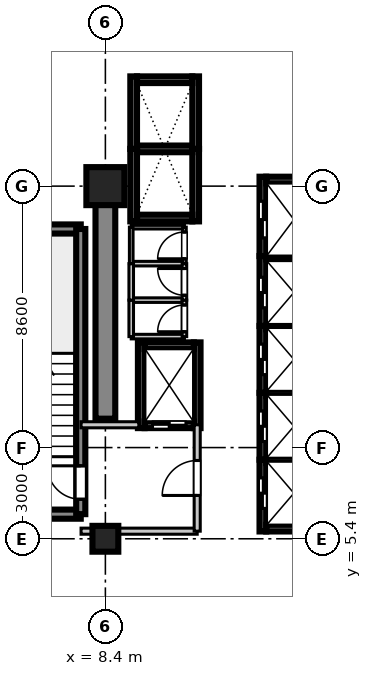
"""IFC4 building model, lengths in metres.
Left out: names, types, materials, properties, quantities, classifications, styles, units other than length and angle.
Written with IfcOpenShell. Run it as: python <this file> out.ifc"""

import sys

from ifc_helpers import new_model, si_unit, direction, frame, frame_2d, origin, origin_2d, place, context, subcontext, project, spatial, rectangle, extrude, source, transform, mapped, element, fill, save


model = new_model("IFC4")
c1 = context("Model", 3, precision=1e-05, world=origin(), true_north=direction((0.0, 1.0)))
c2 = subcontext(c1, "Body", "Model", "MODEL_VIEW")
j1 = project(units=[si_unit("LENGTHUNIT", "METRE"), si_unit("PLANEANGLEUNIT", "RADIAN")], contexts=[c1])
p1 = place(None, origin())
s1 = spatial("IfcSite", under=j1, at=p1, CompositionType="ELEMENT")
p2 = place(p1, origin())
s2 = spatial("IfcBuilding", under=s1, at=p2, CompositionType="ELEMENT")
p3 = place(p2, frame((0.0, 0.0, 110.2)))
s3 = spatial("IfcBuildingStorey", under=s2, at=p3, CompositionType="ELEMENT", Elevation=110.2)
m1 = source(origin(), c2, "Body", "SweptSolid", [
    extrude(rectangle(XDim=0.85, YDim=0.85, at=origin_2d()), origin(), (0.0, 0.0, 1.0), 3.605),
])
p4 = place(p3, frame((8.4, 5.4, 0.0), z_axis=(0.0, 0.0, 1.0), x_axis=(1.0, 0.0, 0.0)))
e1 = element("IfcColumn", 1, at=p4, inside=s3, PredefinedType="PILASTER", context=c2, shape_type="MappedRepresentation", body=[
    mapped(m1, transform((0.0, 0.0, 0.0), scale=1.0)),
])
m2 = source(origin(), c2, "Body", "SweptSolid", [
    extrude(rectangle(XDim=1.25, YDim=1.25, at=origin_2d()), origin(), (0.0, 0.0, 1.0), 3.605),
])
p5 = place(p3, frame((8.4, 17.0, 0.0), z_axis=(0.0, 0.0, 1.0), x_axis=(1.0, 0.0, 0.0)))
e2 = element("IfcColumn", 2, at=p5, inside=s3, PredefinedType="COLUMN", context=c2, shape_type="MappedRepresentation", body=[
    mapped(m2, transform((0.0, 0.0, 0.0), scale=1.0)),
])
m3 = source(origin(), c2, "Body", "SweptSolid", [
    extrude(rectangle(XDim=7.65, YDim=0.65, at=frame_2d((3.825, 0.0))), origin(), (0.0, 0.0, 1.0), 3.38),
])
p6 = place(p3, frame((8.4, 9.35, 0.0), z_axis=(0.0, 0.0, 1.0), x_axis=(0.0, 1.0, 0.0)))
e3 = element("IfcWall", 3, at=p6, inside=s3, PredefinedType="SHEAR", context=c2, shape_type="MappedRepresentation", body=[
    mapped(m3, transform((0.0, 0.0, 0.0), scale=1.0)),
])
m4 = source(origin(), c2, "Body", "SweptSolid", [
    extrude(rectangle(XDim=3.98, YDim=0.3, at=frame_2d((1.99, 0.0))), origin(), (0.0, 0.0, 1.0), 3.38),
])
for number, where, z_axis, x_axis in (
    (4, (3.61, 6.21, 0.0), (0.0, 0.0, 1.0), (1.0, 0.0, 0.0)),
    (5, (3.61, 15.59, 0.0), (0.0, 0.0, 1.0), (1.0, 0.0, 0.0)),
):
    element("IfcWall", number, at=place(p3, frame(where, z_axis=z_axis, x_axis=x_axis)), inside=s3, PredefinedType="SHEAR", context=c2, shape_type="MappedRepresentation", body=[
        mapped(m4, transform((0.0, 0.0, 0.0), scale=1.0)),
    ])
m5 = source(origin(), c2, "Body", "SweptSolid", [
    extrude(rectangle(XDim=9.38, YDim=0.3, at=frame_2d((4.69, 0.0))), origin(), (0.0, 0.0, 1.0), 3.38),
])
p7 = place(p3, frame((7.59, 6.21, 0.0), z_axis=(0.0, 0.0, 1.0), x_axis=(0.0, 1.0, 0.0)))
e6 = element("IfcWall", 6, at=p7, inside=s3, PredefinedType="SHEAR", context=c2, shape_type="MappedRepresentation", body=[
    mapped(m5, transform((0.0, 0.0, 0.0), scale=1.0)),
])
p8 = place(p7, frame((0.49, 0.0, 0.0)))
e7 = element("IfcOpeningElement", 7, at=p8, cuts=e6, PredefinedType="OPENING", context=c2, shape_type="SweptSolid", body=[
    extrude(rectangle(XDim=1.1, YDim=2.15, at=frame_2d((0.55, 1.075))), frame((0.0, 0.16, 0.0), z_axis=(0.0, -1.0, 0.0), x_axis=(1.0, 0.0, 0.0)), (0.0, 0.0, 1.0), 0.32),
])
m6 = source(origin(), c2, "Body", "SweptSolid", [
    extrude(rectangle(XDim=2.36, YDim=0.22, at=frame_2d((1.18, 0.0))), origin(), (0.0, 0.0, 1.0), 3.38),
])
p9 = place(p3, frame((13.58, 5.64, 0.0), z_axis=(0.0, 0.0, 1.0), x_axis=(0.0, 1.0, 0.0)))
e8 = element("IfcWall", 8, at=p9, inside=s3, PredefinedType="SHEAR", context=c2, shape_type="MappedRepresentation", body=[
    mapped(m6, transform((0.0, 0.0, 0.0), scale=1.0)),
])
p10 = place(p9, frame((0.76, 0.0, 0.0)))
e9 = element("IfcOpeningElement", 9, at=p10, cuts=e8, PredefinedType="OPENING", context=c2, shape_type="SweptSolid", body=[
    extrude(rectangle(XDim=1.0, YDim=2.2, at=frame_2d((0.5, 1.1))), frame((0.0, 0.12, 0.0), z_axis=(0.0, -1.0, 0.0), x_axis=(1.0, 0.0, 0.0)), (0.0, 0.0, 1.0), 0.24),
])
m7 = source(origin(), c2, "Body", "SweptSolid", [
    extrude(rectangle(XDim=1.82, YDim=0.22, at=frame_2d((0.91, 0.0))), origin(), (0.0, 0.0, 1.0), 3.38),
])
p11 = place(p3, frame((13.69, 5.75, 0.0), z_axis=(0.0, 0.0, 1.0), x_axis=(1.0, 0.0, 0.0)))
e10 = element("IfcWall", 10, at=p11, inside=s3, PredefinedType="SHEAR", context=c2, shape_type="MappedRepresentation", body=[
    mapped(m7, transform((0.0, 0.0, 0.0), scale=1.0)),
])
m8 = source(origin(), c2, "Body", "SweptSolid", [
    extrude(rectangle(XDim=1.82, YDim=0.22, at=frame_2d((0.91, 0.0))), origin(), (0.0, 0.0, 1.0), 3.65),
])
p12 = place(p3, frame((13.69, 8.0, 0.0), z_axis=(0.0, 0.0, 1.0), x_axis=(1.0, 0.0, 0.0)))
e11 = element("IfcWall", 11, at=p12, inside=s3, PredefinedType="SHEAR", context=c2, shape_type="MappedRepresentation", body=[
    mapped(m8, transform((0.0, 0.0, 0.0), scale=1.0)),
])
m9 = source(origin(), c2, "Body", "SweptSolid", [
    extrude(rectangle(XDim=2.2, YDim=0.22, at=frame_2d((1.1, 0.0))), origin(), (0.0, 0.0, 1.0), 3.38),
])
p13 = place(p3, frame((13.58, 8.0, 0.0), z_axis=(0.0, 0.0, 1.0), x_axis=(0.0, 1.0, 0.0)))
e12 = element("IfcWall", 12, at=p13, inside=s3, PredefinedType="SHEAR", context=c2, shape_type="MappedRepresentation", body=[
    mapped(m9, transform((0.0, 0.0, 0.0), scale=1.0)),
])
p14 = place(p13, frame((0.6, 0.0, 0.0)))
e13 = element("IfcOpeningElement", 13, at=p14, cuts=e12, PredefinedType="OPENING", context=c2, shape_type="SweptSolid", body=[
    extrude(rectangle(XDim=1.0, YDim=2.2, at=frame_2d((0.5, 1.1))), frame((0.0, 0.12, 0.0), z_axis=(0.0, -1.0, 0.0), x_axis=(1.0, 0.0, 0.0)), (0.0, 0.0, 1.0), 0.24),
])
p15 = place(p3, frame((13.69, 10.2, 0.0), z_axis=(0.0, 0.0, 1.0), x_axis=(1.0, 0.0, 0.0)))
e14 = element("IfcWall", 14, at=p15, inside=s3, PredefinedType="SHEAR", context=c2, shape_type="MappedRepresentation", body=[
    mapped(m8, transform((0.0, 0.0, 0.0), scale=1.0)),
])
p16 = place(p3, frame((13.58, 10.2, 0.0), z_axis=(0.0, 0.0, 1.0), x_axis=(0.0, 1.0, 0.0)))
e15 = element("IfcWall", 15, at=p16, inside=s3, PredefinedType="SHEAR", context=c2, shape_type="MappedRepresentation", body=[
    mapped(m9, transform((0.0, 0.0, 0.0), scale=1.0)),
])
p17 = place(p16, frame((0.6, 0.0, 0.0)))
e16 = element("IfcOpeningElement", 16, at=p17, cuts=e15, PredefinedType="OPENING", context=c2, shape_type="SweptSolid", body=[
    extrude(rectangle(XDim=1.0, YDim=2.2, at=frame_2d((0.5, 1.1))), frame((0.0, 0.12, 0.0), z_axis=(0.0, -1.0, 0.0), x_axis=(1.0, 0.0, 0.0)), (0.0, 0.0, 1.0), 0.24),
])
p18 = place(p3, frame((13.69, 12.4, 0.0), z_axis=(0.0, 0.0, 1.0), x_axis=(1.0, 0.0, 0.0)))
e17 = element("IfcWall", 17, at=p18, inside=s3, PredefinedType="SHEAR", context=c2, shape_type="MappedRepresentation", body=[
    mapped(m8, transform((0.0, 0.0, 0.0), scale=1.0)),
])
m10 = source(origin(), c2, "Body", "SweptSolid", [
    extrude(rectangle(XDim=2.3, YDim=0.22, at=frame_2d((1.15, 0.0))), origin(), (0.0, 0.0, 1.0), 3.38),
])
p19 = place(p3, frame((13.58, 12.4, 0.0), z_axis=(0.0, 0.0, 1.0), x_axis=(0.0, 1.0, 0.0)))
e18 = element("IfcWall", 18, at=p19, inside=s3, PredefinedType="SHEAR", context=c2, shape_type="MappedRepresentation", body=[
    mapped(m10, transform((0.0, 0.0, 0.0), scale=1.0)),
])
p20 = place(p19, frame((0.6, 0.0, 0.0)))
e19 = element("IfcOpeningElement", 19, at=p20, cuts=e18, PredefinedType="OPENING", context=c2, shape_type="SweptSolid", body=[
    extrude(rectangle(XDim=1.0, YDim=2.2, at=frame_2d((0.5, 1.1))), frame((0.0, 0.12, 0.0), z_axis=(0.0, -1.0, 0.0), x_axis=(1.0, 0.0, 0.0)), (0.0, 0.0, 1.0), 0.24),
])
p21 = place(p3, frame((13.69, 14.7, 0.0), z_axis=(0.0, 0.0, 1.0), x_axis=(1.0, 0.0, 0.0)))
e20 = element("IfcWall", 20, at=p21, inside=s3, PredefinedType="SHEAR", context=c2, shape_type="MappedRepresentation", body=[
    mapped(m8, transform((0.0, 0.0, 0.0), scale=1.0)),
])
m11 = source(origin(), c2, "Body", "SweptSolid", [
    extrude(rectangle(XDim=2.385, YDim=0.22, at=frame_2d((1.192, 0.0))), origin(), (0.0, 0.0, 1.0), 3.38),
])
for number, where, z_axis, x_axis in (
    (21, (9.33, 15.84, 0.0), (0.0, 0.0, 1.0), (0.0, 1.0, 0.0)),
    (22, (11.37, 15.84, 0.0), (0.0, 0.0, 1.0), (0.0, 1.0, 0.0)),
):
    element("IfcWall", number, at=place(p3, frame(where, z_axis=z_axis, x_axis=x_axis)), inside=s3, PredefinedType="SHEAR", context=c2, shape_type="MappedRepresentation", body=[
        mapped(m11, transform((0.0, 0.0, 0.0), scale=1.0)),
    ])
p22 = place(p3, frame((9.44, 15.95, 0.0), z_axis=(0.0, 0.0, 1.0), x_axis=(1.0, 0.0, 0.0)))
e23 = element("IfcWall", 23, at=p22, inside=s3, PredefinedType="SHEAR", context=c2, shape_type="MappedRepresentation", body=[
    mapped(m7, transform((0.0, 0.0, 0.0), scale=1.0)),
])
p23 = place(p3, frame((9.44, 18.225, 0.0), z_axis=(0.0, 0.0, 1.0), x_axis=(1.0, 0.0, 0.0)))
e24 = element("IfcWall", 24, at=p23, inside=s3, PredefinedType="SHEAR", context=c2, shape_type="MappedRepresentation", body=[
    mapped(m8, transform((0.0, 0.0, 0.0), scale=1.0)),
])
for number, where, z_axis, x_axis in (
    (25, (9.33, 18.225, 0.0), (0.0, 0.0, 1.0), (0.0, 1.0, 0.0)),
    (26, (11.37, 18.225, 0.0), (0.0, 0.0, 1.0), (0.0, 1.0, 0.0)),
):
    element("IfcWall", number, at=place(p3, frame(where, z_axis=z_axis, x_axis=x_axis)), inside=s3, PredefinedType="SHEAR", context=c2, shape_type="MappedRepresentation", body=[
        mapped(m11, transform((0.0, 0.0, 0.0), scale=1.0)),
    ])
p24 = place(p3, frame((9.44, 20.5, 0.0), z_axis=(0.0, 0.0, 1.0), x_axis=(1.0, 0.0, 0.0)))
e27 = element("IfcWall", 27, at=p24, inside=s3, PredefinedType="SHEAR", context=c2, shape_type="MappedRepresentation", body=[
    mapped(m7, transform((0.0, 0.0, 0.0), scale=1.0)),
])
m12 = source(origin(), c2, "Body", "SweptSolid", [
    extrude(rectangle(XDim=2.82, YDim=0.22, at=frame_2d((1.41, 0.0))), origin(), (0.0, 0.0, 1.0), 3.38),
])
for number, where, z_axis, x_axis in (
    (28, (9.58, 9.04, 0.0), (0.0, 0.0, 1.0), (0.0, 1.0, 0.0)),
    (29, (11.42, 9.04, 0.0), (0.0, 0.0, 1.0), (0.0, 1.0, 0.0)),
):
    element("IfcWall", number, at=place(p3, frame(where, z_axis=z_axis, x_axis=x_axis)), inside=s3, PredefinedType="SHEAR", context=c2, shape_type="MappedRepresentation", body=[
        mapped(m12, transform((0.0, 0.0, 0.0), scale=1.0)),
    ])
m13 = source(origin(), c2, "Body", "SweptSolid", [
    extrude(rectangle(XDim=1.62, YDim=0.22, at=frame_2d((0.81, 0.0))), origin(), (0.0, 0.0, 1.0), 3.38),
])
p25 = place(p3, frame((9.69, 9.15, 0.0), z_axis=(0.0, 0.0, 1.0), x_axis=(1.0, 0.0, 0.0)))
e30 = element("IfcWall", 30, at=p25, inside=s3, PredefinedType="SHEAR", context=c2, shape_type="MappedRepresentation", body=[
    mapped(m13, transform((0.0, 0.0, 0.0), scale=1.0)),
])
p26 = place(p25, frame((0.26, 0.0, 0.0)))
e31 = element("IfcOpeningElement", 31, at=p26, cuts=e30, PredefinedType="OPENING", context=c2, shape_type="SweptSolid", body=[
    extrude(rectangle(XDim=1.1, YDim=2.2, at=frame_2d((0.55, 1.1))), frame((0.0, 0.12, 0.0), z_axis=(0.0, -1.0, 0.0), x_axis=(1.0, 0.0, 0.0)), (0.0, 0.0, 1.0), 0.24),
])
p27 = place(p3, frame((9.69, 11.75, 0.0), z_axis=(0.0, 0.0, 1.0), x_axis=(1.0, 0.0, 0.0)))
e32 = element("IfcWall", 32, at=p27, inside=s3, PredefinedType="SHEAR", context=c2, shape_type="MappedRepresentation", body=[
    mapped(m13, transform((0.0, 0.0, 0.0), scale=1.0)),
])
m14 = source(origin(), c2, "Body", "SweptSolid", [
    extrude(rectangle(XDim=2.61, YDim=0.22, at=frame_2d((1.305, 0.0))), origin(), (0.0, 0.0, 1.0), 3.38),
])
p28 = place(p3, frame((13.58, 14.7, 0.0), z_axis=(0.0, 0.0, 1.0), x_axis=(0.0, 1.0, 0.0)))
e33 = element("IfcWall", 33, at=p28, inside=s3, PredefinedType="SHEAR", context=c2, shape_type="MappedRepresentation", body=[
    mapped(m14, transform((0.0, 0.0, 0.0), scale=1.0)),
])
p29 = place(p28, frame((0.6, 0.0, 0.0)))
e34 = element("IfcOpeningElement", 34, at=p29, cuts=e33, PredefinedType="OPENING", context=c2, shape_type="SweptSolid", body=[
    extrude(rectangle(XDim=1.2, YDim=2.2, at=frame_2d((0.6, 1.1))), frame((0.0, 0.12, 0.0), z_axis=(0.0, -1.0, 0.0), x_axis=(1.0, 0.0, 0.0)), (0.0, 0.0, 1.0), 0.24),
])
p30 = place(p3, frame((13.69, 17.2, 0.0), z_axis=(0.0, 0.0, 1.0), x_axis=(1.0, 0.0, 0.0)))
e35 = element("IfcWall", 35, at=p30, inside=s3, PredefinedType="SHEAR", context=c2, shape_type="MappedRepresentation", body=[
    mapped(m7, transform((0.0, 0.0, 0.0), scale=1.0)),
])
m15 = source(origin(), c2, "Body", "SweptSolid", [
    extrude(rectangle(XDim=3.82, YDim=0.2, at=frame_2d((1.91, 0.0))), origin(), (0.0, 0.0, 1.0), 2.72),
])
p31 = place(p3, frame((7.6, 5.65, 0.0), z_axis=(0.0, 0.0, 1.0), x_axis=(1.0, 0.0, 0.0)))
e36 = element("IfcWall", 36, at=p31, inside=s3, PredefinedType="PARTITIONING", context=c2, shape_type="MappedRepresentation", body=[
    mapped(m15, transform((0.0, 0.0, 0.0), scale=1.0)),
])
m16 = source(origin(), c2, "Body", "SweptSolid", [
    extrude(rectangle(XDim=1.9, YDim=0.2, at=frame_2d((0.95, 0.0))), origin(), (0.0, 0.0, 1.0), 2.72),
])
p32 = place(p3, frame((7.6, 9.15, 0.0), z_axis=(0.0, 0.0, 1.0), x_axis=(1.0, 0.0, 0.0)))
e37 = element("IfcWall", 37, at=p32, inside=s3, PredefinedType="PARTITIONING", context=c2, shape_type="MappedRepresentation", body=[
    mapped(m16, transform((0.0, 0.0, 0.0), scale=1.0)),
])
m17 = source(origin(), c2, "Body", "SweptSolid", [
    extrude(rectangle(XDim=3.5, YDim=0.2, at=frame_2d((1.75, 0.0))), origin(), (0.0, 0.0, 1.0), 2.72),
])
p33 = place(p3, frame((11.42, 5.65, 0.0), z_axis=(0.0, 0.0, 1.0), x_axis=(0.0, 1.0, 0.0)))
e38 = element("IfcWall", 38, at=p33, inside=s3, PredefinedType="PARTITIONING", context=c2, shape_type="MappedRepresentation", body=[
    mapped(m17, transform((0.0, 0.0, 0.0), scale=1.0)),
])
p34 = place(p33, frame((1.175, 0.0, 0.0)))
e39 = element("IfcOpeningElement", 39, at=p34, cuts=e38, PredefinedType="OPENING", context=c2, shape_type="SweptSolid", body=[
    extrude(rectangle(XDim=1.15, YDim=2.15, at=frame_2d((0.575, 1.075))), frame((0.0, 0.11, 0.0), z_axis=(0.0, -1.0, 0.0), x_axis=(1.0, 0.0, 0.0)), (0.0, 0.0, 1.0), 0.22),
])
m18 = source(origin(), c2, "Body", "SweptSolid", [
    extrude(rectangle(XDim=1.75, YDim=0.15, at=frame_2d((0.875, 0.0))), origin(), (0.0, 0.0, 1.0), 2.72),
])
for number, where, z_axis, x_axis in (
    (40, (9.25, 12.05, 0.0), (0.0, 0.0, 1.0), (1.0, 0.0, 0.0)),
    (41, (9.25, 13.25, 0.0), (0.0, 0.0, 1.0), (1.0, 0.0, 0.0)),
):
    element("IfcWall", number, at=place(p3, frame(where, z_axis=z_axis, x_axis=x_axis)), inside=s3, PredefinedType="PARTITIONING", context=c2, shape_type="MappedRepresentation", body=[
        mapped(m18, transform((0.0, 0.0, 0.0), scale=1.0)),
    ])
m19 = source(origin(), c2, "Body", "SweptSolid", [
    extrude(rectangle(XDim=1.2, YDim=0.15, at=frame_2d((0.6, 0.0))), origin(), (0.0, 0.0, 1.0), 2.72),
])
p35 = place(p3, frame((9.25, 12.05, 0.0), z_axis=(0.0, 0.0, 1.0), x_axis=(0.0, 1.0, 0.0)))
e42 = element("IfcWall", 42, at=p35, inside=s3, PredefinedType="PARTITIONING", context=c2, shape_type="MappedRepresentation", body=[
    mapped(m19, transform((0.0, 0.0, 0.0), scale=1.0)),
])
p36 = place(p3, frame((11.0, 12.05, 0.0), z_axis=(0.0, 0.0, 1.0), x_axis=(0.0, 1.0, 0.0)))
e43 = element("IfcWall", 43, at=p36, inside=s3, PredefinedType="PARTITIONING", context=c2, shape_type="MappedRepresentation", body=[
    mapped(m19, transform((0.0, 0.0, 0.0), scale=1.0)),
])
p37 = place(p36, frame((0.16, 0.0, 0.0)))
e44 = element("IfcOpeningElement", 44, at=p37, cuts=e43, PredefinedType="OPENING", context=c2, shape_type="SweptSolid", body=[
    extrude(rectangle(XDim=0.88, YDim=2.1, at=frame_2d((0.44, 1.05))), frame((0.0, 0.085, 0.0), z_axis=(0.0, -1.0, 0.0), x_axis=(1.0, 0.0, 0.0)), (0.0, 0.0, 1.0), 0.17),
])
p38 = place(p3, frame((9.25, 14.45, 0.0), z_axis=(0.0, 0.0, 1.0), x_axis=(1.0, 0.0, 0.0)))
e45 = element("IfcWall", 45, at=p38, inside=s3, PredefinedType="PARTITIONING", context=c2, shape_type="MappedRepresentation", body=[
    mapped(m18, transform((0.0, 0.0, 0.0), scale=1.0)),
])
p39 = place(p3, frame((9.25, 13.25, 0.0), z_axis=(0.0, 0.0, 1.0), x_axis=(0.0, 1.0, 0.0)))
e46 = element("IfcWall", 46, at=p39, inside=s3, PredefinedType="PARTITIONING", context=c2, shape_type="MappedRepresentation", body=[
    mapped(m19, transform((0.0, 0.0, 0.0), scale=1.0)),
])
p40 = place(p3, frame((11.0, 13.25, 0.0), z_axis=(0.0, 0.0, 1.0), x_axis=(0.0, 1.0, 0.0)))
e47 = element("IfcWall", 47, at=p40, inside=s3, PredefinedType="PARTITIONING", context=c2, shape_type="MappedRepresentation", body=[
    mapped(m19, transform((0.0, 0.0, 0.0), scale=1.0)),
])
p41 = place(p40, frame((0.16, 0.0, 0.0)))
e48 = element("IfcOpeningElement", 48, at=p41, cuts=e47, PredefinedType="OPENING", context=c2, shape_type="SweptSolid", body=[
    extrude(rectangle(XDim=0.88, YDim=2.1, at=frame_2d((0.44, 1.05))), frame((0.0, 0.085, 0.0), z_axis=(0.0, -1.0, 0.0), x_axis=(1.0, 0.0, 0.0)), (0.0, 0.0, 1.0), 0.17),
])
m20 = source(origin(), c2, "Body", "SweptSolid", [
    extrude(rectangle(XDim=1.75, YDim=0.12, at=frame_2d((0.875, 0.0))), origin(), (0.0, 0.0, 1.0), 2.72),
])
p42 = place(p3, frame((9.25, 15.65, 0.0), z_axis=(0.0, 0.0, 1.0), x_axis=(1.0, 0.0, 0.0)))
e49 = element("IfcWall", 49, at=p42, inside=s3, PredefinedType="PARTITIONING", context=c2, shape_type="MappedRepresentation", body=[
    mapped(m20, transform((0.0, 0.0, 0.0), scale=1.0)),
])
m21 = source(origin(), c2, "Body", "SweptSolid", [
    extrude(rectangle(XDim=1.2, YDim=0.12, at=frame_2d((0.6, 0.0))), origin(), (0.0, 0.0, 1.0), 2.72),
])
p43 = place(p3, frame((9.25, 14.45, 0.0), z_axis=(0.0, 0.0, 1.0), x_axis=(0.0, 1.0, 0.0)))
e50 = element("IfcWall", 50, at=p43, inside=s3, PredefinedType="PARTITIONING", context=c2, shape_type="MappedRepresentation", body=[
    mapped(m21, transform((0.0, 0.0, 0.0), scale=1.0)),
])
p44 = place(p3, frame((11.0, 14.45, 0.0), z_axis=(0.0, 0.0, 1.0), x_axis=(0.0, 1.0, 0.0)))
e51 = element("IfcWall", 51, at=p44, inside=s3, PredefinedType="PARTITIONING", context=c2, shape_type="MappedRepresentation", body=[
    mapped(m21, transform((0.0, 0.0, 0.0), scale=1.0)),
])
p45 = place(p44, frame((0.16, 0.0, 0.0)))
e52 = element("IfcOpeningElement", 52, at=p45, cuts=e51, PredefinedType="OPENING", context=c2, shape_type="SweptSolid", body=[
    extrude(rectangle(XDim=0.88, YDim=2.1, at=frame_2d((0.44, 1.05))), frame((0.0, 0.07, 0.0), z_axis=(0.0, -1.0, 0.0), x_axis=(1.0, 0.0, 0.0)), (0.0, 0.0, 1.0), 0.14),
])
m22 = source(origin(), c2, "Body", "SweptSolid", [
    extrude(rectangle(XDim=1.1, YDim=2.15, at=frame_2d((0.55, 1.075))), frame((0.0, 0.025, 0.0), z_axis=(0.0, -1.0, 0.0), x_axis=(1.0, 0.0, 0.0)), (0.0, 0.0, 1.0), 0.05),
])
p46 = place(p8, origin())
e53 = element("IfcDoor", 53, at=p46, inside=s3, OperationType="SINGLE_SWING_RIGHT", PredefinedType="DOOR", context=c2, shape_type="MappedRepresentation", body=[
    mapped(m22, transform((0.0, 0.0, 0.0), scale=1.0)),
])
fill(e7, e53)
m23 = source(origin(), c2, "Body", "SweptSolid", [
    extrude(rectangle(XDim=1.0, YDim=2.2, at=frame_2d((0.5, 1.1))), frame((0.0, 0.025, 0.0), z_axis=(0.0, -1.0, 0.0), x_axis=(1.0, 0.0, 0.0)), (0.0, 0.0, 1.0), 0.05),
])
p47 = place(p10, origin())
e54 = element("IfcDoor", 54, at=p47, inside=s3, OperationType="DOUBLE_DOOR_SLIDING", PredefinedType="DOOR", context=c2, shape_type="MappedRepresentation", body=[
    mapped(m23, transform((0.0, 0.0, 0.0), scale=1.0)),
])
fill(e9, e54)
p48 = place(p14, origin())
e55 = element("IfcDoor", 55, at=p48, inside=s3, OperationType="DOUBLE_DOOR_SLIDING", PredefinedType="DOOR", context=c2, shape_type="MappedRepresentation", body=[
    mapped(m23, transform((0.0, 0.0, 0.0), scale=1.0)),
])
fill(e13, e55)
p49 = place(p17, origin())
e56 = element("IfcDoor", 56, at=p49, inside=s3, OperationType="DOUBLE_DOOR_SLIDING", PredefinedType="DOOR", context=c2, shape_type="MappedRepresentation", body=[
    mapped(m23, transform((0.0, 0.0, 0.0), scale=1.0)),
])
fill(e16, e56)
p50 = place(p20, origin())
e57 = element("IfcDoor", 57, at=p50, inside=s3, OperationType="DOUBLE_DOOR_SLIDING", PredefinedType="DOOR", context=c2, shape_type="MappedRepresentation", body=[
    mapped(m23, transform((0.0, 0.0, 0.0), scale=1.0)),
])
fill(e19, e57)
m24 = source(origin(), c2, "Body", "SweptSolid", [
    extrude(rectangle(XDim=1.1, YDim=2.2, at=frame_2d((0.55, 1.1))), frame((0.0, 0.025, 0.0), z_axis=(0.0, -1.0, 0.0), x_axis=(1.0, 0.0, 0.0)), (0.0, 0.0, 1.0), 0.05),
])
p51 = place(p26, frame((1.1, 0.0, 0.0), z_axis=(0.0, 0.0, 1.0), x_axis=(-1.0, 0.0, 0.0)))
e58 = element("IfcDoor", 58, at=p51, inside=s3, OperationType="DOUBLE_DOOR_SLIDING", PredefinedType="DOOR", context=c2, shape_type="MappedRepresentation", body=[
    mapped(m24, transform((0.0, 0.0, 0.0), scale=1.0)),
])
fill(e31, e58)
m25 = source(origin(), c2, "Body", "SweptSolid", [
    extrude(rectangle(XDim=1.2, YDim=2.2, at=frame_2d((0.6, 1.1))), frame((0.0, 0.025, 0.0), z_axis=(0.0, -1.0, 0.0), x_axis=(1.0, 0.0, 0.0)), (0.0, 0.0, 1.0), 0.05),
])
p52 = place(p29, origin())
e59 = element("IfcDoor", 59, at=p52, inside=s3, OperationType="DOUBLE_DOOR_SLIDING", PredefinedType="DOOR", context=c2, shape_type="MappedRepresentation", body=[
    mapped(m25, transform((0.0, 0.0, 0.0), scale=1.0)),
])
fill(e34, e59)
m26 = source(origin(), c2, "Body", "SweptSolid", [
    extrude(rectangle(XDim=1.15, YDim=2.15, at=frame_2d((0.575, 1.075))), frame((0.0, 0.025, 0.0), z_axis=(0.0, -1.0, 0.0), x_axis=(1.0, 0.0, 0.0)), (0.0, 0.0, 1.0), 0.05),
])
p53 = place(p34, frame((1.15, 0.0, 0.0), z_axis=(0.0, 0.0, 1.0), x_axis=(-1.0, 0.0, 0.0)))
e60 = element("IfcDoor", 60, at=p53, inside=s3, OperationType="SINGLE_SWING_LEFT", PredefinedType="DOOR", context=c2, shape_type="MappedRepresentation", body=[
    mapped(m26, transform((0.0, 0.0, 0.0), scale=1.0)),
])
fill(e39, e60)
m27 = source(origin(), c2, "Body", "SweptSolid", [
    extrude(rectangle(XDim=0.88, YDim=2.1, at=frame_2d((0.44, 1.05))), frame((0.0, 0.025, 0.0), z_axis=(0.0, -1.0, 0.0), x_axis=(1.0, 0.0, 0.0)), (0.0, 0.0, 1.0), 0.05),
])
p54 = place(p37, origin())
e61 = element("IfcDoor", 61, at=p54, inside=s3, OperationType="SINGLE_SWING_LEFT", PredefinedType="DOOR", context=c2, shape_type="MappedRepresentation", body=[
    mapped(m27, transform((0.0, 0.0, 0.0), scale=1.0)),
])
fill(e44, e61)
p55 = place(p41, origin())
e62 = element("IfcDoor", 62, at=p55, inside=s3, OperationType="SINGLE_SWING_RIGHT", PredefinedType="DOOR", context=c2, shape_type="MappedRepresentation", body=[
    mapped(m27, transform((0.0, 0.0, 0.0), scale=1.0)),
])
fill(e48, e62)
p56 = place(p45, origin())
e63 = element("IfcDoor", 63, at=p56, inside=s3, OperationType="SINGLE_SWING_LEFT", PredefinedType="DOOR", context=c2, shape_type="MappedRepresentation", body=[
    mapped(m27, transform((0.0, 0.0, 0.0), scale=1.0)),
])
fill(e52, e63)
save(model, sys.argv[1])
